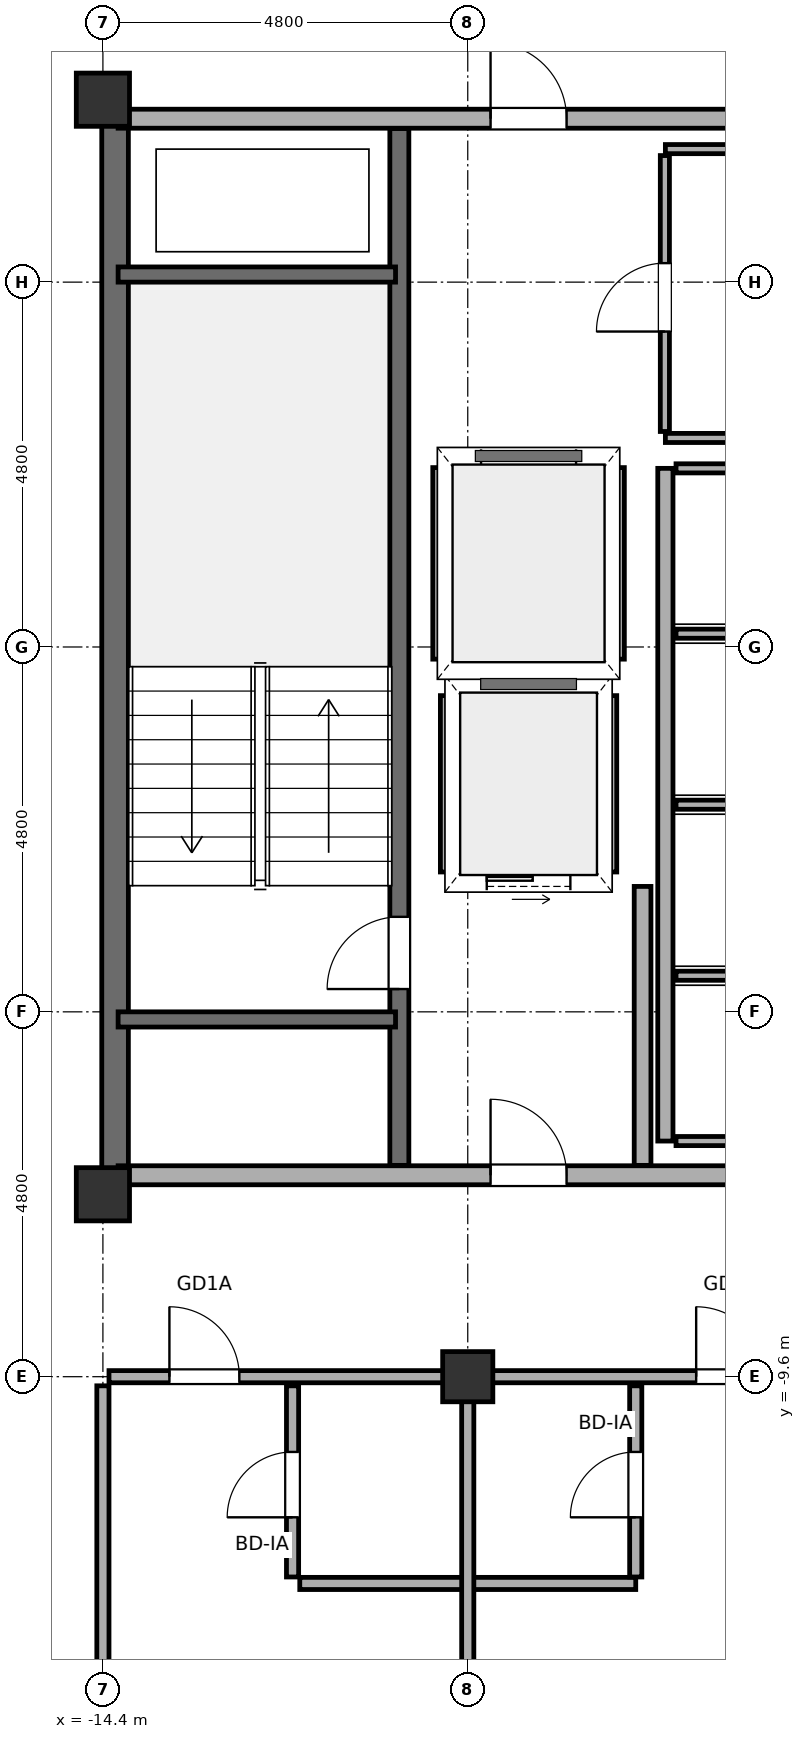
"""IFC4 building model, lengths in metres.
Left out: names, types, materials, properties, quantities, classifications, styles, units other than length and angle.
Written with IfcOpenShell. Run it as: python <this file> out.ifc"""

import sys

from ifc_helpers import new_model, si_unit, direction, frame, frame_2d, origin, origin_2d, place, context, subcontext, project, spatial, rectangle, hollow_rectangle, hollow_circle, extrude, element, fill, save


model = new_model("IFC4")
c1 = context("Model", 3, precision=1e-05, world=origin(), true_north=direction((0.0, 1.0)))
c2 = subcontext(c1, "Body", "Model", "MODEL_VIEW")
j1 = project(units=[si_unit("LENGTHUNIT", "METRE"), si_unit("PLANEANGLEUNIT", "RADIAN")], contexts=[c1])
p1 = place(None, origin())
s1 = spatial("IfcSite", under=j1, at=p1, CompositionType="ELEMENT")
p2 = place(p1, origin())
s2 = spatial("IfcBuilding", under=s1, at=p2, CompositionType="ELEMENT")
p3 = place(p2, frame((0.0, 0.0, 124.8)))
s3 = spatial("IfcBuildingStorey", under=s2, at=p3, CompositionType="ELEMENT", Elevation=124.8)
for number, where, z_axis, x_axis in (
    (1, (-14.4, -7.2, 0.0), (0.0, 0.0, 1.0), (1.0, 0.0, 0.0)),
    (2, (-14.4, 7.2, 0.0), (0.0, 0.0, 1.0), (1.0, 0.0, 0.0)),
):
    element("IfcColumn", number, at=place(p3, frame(where, z_axis=z_axis, x_axis=x_axis)), inside=s3, PredefinedType="COLUMN", context=c2, shape_type="SweptSolid", body=[
        extrude(hollow_rectangle(XDim=0.7, YDim=0.7, WallThickness=0.032, at=origin_2d()), origin(), (0.0, 0.0, 1.0), 3.7),
    ])
p4 = place(p3, frame((-9.6, -9.6, 0.0), z_axis=(0.0, 0.0, 1.0), x_axis=(1.0, 0.0, 0.0)))
e3 = element("IfcColumn", 3, at=p4, inside=s3, PredefinedType="COLUMN", context=c2, shape_type="SweptSolid", body=[
    extrude(hollow_circle(Radius=0.33, WallThickness=0.028, at=origin_2d()), origin(), (0.0, 0.0, 1.0), 3.7),
])
p5 = place(p3, frame((-14.24, -7.2, -0.18), z_axis=(0.0, 0.0, 1.0), x_axis=(0.0, 1.0, 0.0)))
e4 = element("IfcWall", 4, at=p5, inside=s3, PredefinedType="SHEAR", context=c2, shape_type="SweptSolid", body=[
    extrude(rectangle(XDim=14.4, YDim=0.35, at=frame_2d((7.2, 0.0))), origin(), (0.0, 0.0, 1.0), 3.7),
])
p6 = place(p3, frame((-14.2, -6.95, 0.0), z_axis=(0.0, 0.0, 1.0), x_axis=(1.0, 0.0, 0.0)))
e5 = element("IfcWall", 5, at=p6, inside=s3, PredefinedType="SOLIDWALL", context=c2, shape_type="SweptSolid", body=[
    extrude(rectangle(XDim=9.4, YDim=0.25, at=frame_2d((4.7, 0.0))), origin(), (0.0, 0.0, 1.0), 2.12),
])
p7 = place(p6, frame((4.9, 0.0, 0.0)))
e6 = element("IfcOpeningElement", 6, at=p7, cuts=e5, PredefinedType="OPENING", context=c2, shape_type="SweptSolid", body=[
    extrude(rectangle(XDim=1.0, YDim=2.02, at=frame_2d((0.5, 1.01))), frame((0.0, 0.14, 0.0), z_axis=(0.0, -1.0, 0.0), x_axis=(1.0, 0.0, 0.0)), (0.0, 0.0, 1.0), 0.28),
])
p8 = place(p3, frame((-14.2, 6.95, 0.0), z_axis=(0.0, 0.0, 1.0), x_axis=(1.0, 0.0, 0.0)))
e7 = element("IfcWall", 7, at=p8, inside=s3, PredefinedType="SOLIDWALL", context=c2, shape_type="SweptSolid", body=[
    extrude(rectangle(XDim=9.4, YDim=0.25, at=frame_2d((4.7, 0.0))), origin(), (0.0, 0.0, 1.0), 2.12),
])
p9 = place(p8, frame((4.9, 0.0, 0.0)))
e8 = element("IfcOpeningElement", 8, at=p9, cuts=e7, PredefinedType="OPENING", context=c2, shape_type="SweptSolid", body=[
    extrude(rectangle(XDim=1.0, YDim=2.02, at=frame_2d((0.5, 1.01))), frame((0.0, 0.14, 0.0), z_axis=(0.0, -1.0, 0.0), x_axis=(1.0, 0.0, 0.0)), (0.0, 0.0, 1.0), 0.28),
])
p10 = place(p3, frame((-7.3, -6.82, 0.0), z_axis=(0.0, 0.0, 1.0), x_axis=(0.0, 1.0, 0.0)))
e9 = element("IfcWall", 9, at=p10, inside=s3, PredefinedType="SOLIDWALL", context=c2, shape_type="SweptSolid", body=[
    extrude(rectangle(XDim=3.67, YDim=0.22, at=frame_2d((1.835, 0.0))), origin(), (0.0, 0.0, 1.0), 2.12),
])
p11 = place(p3, frame((-10.5, -6.82, -0.18), z_axis=(0.0, 0.0, 1.0), x_axis=(0.0, 1.0, 0.0)))
e10 = element("IfcWall", 10, at=p11, inside=s3, PredefinedType="SOLIDWALL", context=c2, shape_type="SweptSolid", body=[
    extrude(rectangle(XDim=13.64, YDim=0.25, at=frame_2d((6.82, 0.0))), origin(), (0.0, 0.0, 1.0), 3.7),
])
p12 = place(p11, frame((2.32, 0.0, 0.18)))
e11 = element("IfcOpeningElement", 11, at=p12, cuts=e10, PredefinedType="OPENING", context=c2, shape_type="SweptSolid", body=[
    extrude(rectangle(XDim=0.95, YDim=2.15, at=frame_2d((0.475, 1.075))), frame((0.0, 0.14, 0.0), z_axis=(0.0, -1.0, 0.0), x_axis=(1.0, 0.0, 0.0)), (0.0, 0.0, 1.0), 0.28),
])
for number, where, z_axis, x_axis in (
    (12, (-14.2, -4.9, -0.18), (0.0, 0.0, 1.0), (1.0, 0.0, 0.0)),
    (13, (-14.2, 4.9, -0.18), (0.0, 0.0, 1.0), (1.0, 0.0, 0.0)),
):
    element("IfcWall", number, at=place(p3, frame(where, z_axis=z_axis, x_axis=x_axis)), inside=s3, PredefinedType="SOLIDWALL", context=c2, shape_type="SweptSolid", body=[
        extrude(rectangle(XDim=3.65, YDim=0.2, at=frame_2d((1.825, 0.0))), origin(), (0.0, 0.0, 1.0), 3.7),
    ])
p13 = place(p3, frame((-7.0, -6.5, 0.0), z_axis=(0.0, 0.0, 1.0), x_axis=(0.0, 1.0, 0.0)))
e14 = element("IfcWall", 14, at=p13, inside=s3, PredefinedType="SOLIDWALL", context=c2, shape_type="SweptSolid", body=[
    extrude(rectangle(XDim=8.85, YDim=0.2, at=frame_2d((4.425, 0.0))), origin(), (0.0, 0.0, 1.0), 3.52),
])
for number, where, z_axis, x_axis in (
    (15, (-6.86, -6.5, 0.0), (0.0, 0.0, 1.0), (1.0, 0.0, 0.0)),
    (16, (-6.86, -4.325, 0.0), (0.0, 0.0, 1.0), (1.0, 0.0, 0.0)),
    (17, (-6.86, -2.075, 0.0), (0.0, 0.0, 1.0), (1.0, 0.0, 0.0)),
    (18, (-6.86, 0.175, 0.0), (0.0, 0.0, 1.0), (1.0, 0.0, 0.0)),
    (19, (-6.86, 2.35, 0.0), (0.0, 0.0, 1.0), (1.0, 0.0, 0.0)),
):
    element("IfcWall", number, at=place(p3, frame(where, z_axis=z_axis, x_axis=x_axis)), inside=s3, PredefinedType="PARTITIONING", context=c2, shape_type="SweptSolid", body=[
        extrude(rectangle(XDim=2.22, YDim=0.12, at=frame_2d((1.11, 0.0))), origin(), (0.0, 0.0, 1.0), 3.52),
    ])
p14 = place(p3, frame((-9.82, -3.1, 0.0), z_axis=(0.0, 0.0, 1.0), x_axis=(1.0, 0.0, 0.0)))
e20 = element("IfcWall", 20, at=p14, inside=s3, PredefinedType="SOLIDWALL", context=c2, shape_type="SweptSolid", body=[
    extrude(rectangle(XDim=2.04, YDim=0.2, at=frame_2d((1.02, 0.0))), origin(), (0.0, 0.0, 1.0), 3.52),
])
p15 = place(p14, frame((0.47, 0.0, 0.0)))
e21 = element("IfcOpeningElement", 21, at=p15, cuts=e20, PredefinedType="OPENING", context=c2, shape_type="SweptSolid", body=[
    extrude(rectangle(XDim=1.1, YDim=2.2, at=frame_2d((0.55, 1.1))), frame((0.0, 0.115, 0.0), z_axis=(0.0, -1.0, 0.0), x_axis=(1.0, 0.0, 0.0)), (0.0, 0.0, 1.0), 0.23),
])
p16 = place(p3, frame((-9.82, -0.5, 0.0), z_axis=(0.0, 0.0, 1.0), x_axis=(1.0, 0.0, 0.0)))
e22 = element("IfcWall", 22, at=p16, inside=s3, PredefinedType="SOLIDWALL", context=c2, shape_type="SweptSolid", body=[
    extrude(rectangle(XDim=2.04, YDim=0.2, at=frame_2d((1.02, 0.0))), origin(), (0.0, 0.0, 1.0), 3.52),
])
for number, where, z_axis, x_axis in (
    (23, (-9.9, -2.96, 0.0), (0.0, 0.0, 1.0), (0.0, 1.0, 0.0)),
    (24, (-7.7, -2.96, 0.0), (0.0, 0.0, 1.0), (0.0, 1.0, 0.0)),
):
    element("IfcWall", number, at=place(p3, frame(where, z_axis=z_axis, x_axis=x_axis)), inside=s3, PredefinedType="PARTITIONING", context=c2, shape_type="SweptSolid", body=[
        extrude(rectangle(XDim=2.32, YDim=0.12, at=frame_2d((1.16, 0.0))), origin(), (0.0, 0.0, 1.0), 3.52),
    ])
p17 = place(p3, frame((-9.92, 2.5, 0.0), z_axis=(0.0, 0.0, 1.0), x_axis=(1.0, 0.0, 0.0)))
e25 = element("IfcWall", 25, at=p17, inside=s3, PredefinedType="SOLIDWALL", context=c2, shape_type="SweptSolid", body=[
    extrude(rectangle(XDim=2.24, YDim=0.2, at=frame_2d((1.12, 0.0))), origin(), (0.0, 0.0, 1.0), 3.52),
])
p18 = place(p17, frame((0.495, 0.0, 0.0)))
e26 = element("IfcOpeningElement", 26, at=p18, cuts=e25, PredefinedType="OPENING", context=c2, shape_type="SweptSolid", body=[
    extrude(rectangle(XDim=1.25, YDim=2.25, at=frame_2d((0.625, 1.125))), frame((0.0, 0.115, 0.0), z_axis=(0.0, -1.0, 0.0), x_axis=(1.0, 0.0, 0.0)), (0.0, 0.0, 1.0), 0.23),
])
p19 = place(p3, frame((-9.92, -0.3, 0.0), z_axis=(0.0, 0.0, 1.0), x_axis=(1.0, 0.0, 0.0)))
e27 = element("IfcWall", 27, at=p19, inside=s3, PredefinedType="SOLIDWALL", context=c2, shape_type="SweptSolid", body=[
    extrude(rectangle(XDim=2.24, YDim=0.2, at=frame_2d((1.12, 0.0))), origin(), (0.0, 0.0, 1.0), 3.52),
])
for number, where, z_axis, x_axis in (
    (28, (-10.0, -0.16, 0.0), (0.0, 0.0, 1.0), (0.0, 1.0, 0.0)),
    (29, (-7.6, -0.16, 0.0), (0.0, 0.0, 1.0), (0.0, 1.0, 0.0)),
):
    element("IfcWall", number, at=place(p3, frame(where, z_axis=z_axis, x_axis=x_axis)), inside=s3, PredefinedType="PARTITIONING", context=c2, shape_type="SweptSolid", body=[
        extrude(rectangle(XDim=2.52, YDim=0.12, at=frame_2d((1.26, 0.0))), origin(), (0.0, 0.0, 1.0), 3.52),
    ])
p20 = place(p3, frame((-11.81, -12.32, 0.0), z_axis=(0.0, 0.0, 1.0), x_axis=(1.0, 0.0, 0.0)))
e30 = element("IfcWall", 30, at=p20, inside=s3, PredefinedType="PARTITIONING", context=c2, shape_type="SweptSolid", body=[
    extrude(rectangle(XDim=4.42, YDim=0.16, at=frame_2d((2.21, 0.0))), origin(), (0.0, 0.0, 1.0), 3.12),
])
p21 = place(p3, frame((-14.32, -9.6, 0.0), z_axis=(0.0, 0.0, 1.0), x_axis=(1.0, 0.0, 0.0)))
e31 = element("IfcWall", 31, at=p21, inside=s3, PredefinedType="PARTITIONING", context=c2, shape_type="SweptSolid", body=[
    extrude(rectangle(XDim=28.64, YDim=0.16, at=frame_2d((14.32, 0.0))), origin(), (0.0, 0.0, 1.0), 2.12),
])
p22 = place(p21, frame((0.795, 0.0, 0.0)))
e32 = element("IfcOpeningElement", 32, at=p22, cuts=e31, PredefinedType="OPENING", context=c2, shape_type="SweptSolid", body=[
    extrude(rectangle(XDim=0.92, YDim=2.02, at=frame_2d((0.46, 1.01))), frame((0.0, 0.095, 0.0), z_axis=(0.0, -1.0, 0.0), x_axis=(1.0, 0.0, 0.0)), (0.0, 0.0, 1.0), 0.19),
])
p23 = place(p21, frame((7.725, 0.0, 0.0)))
e33 = element("IfcOpeningElement", 33, at=p23, cuts=e31, PredefinedType="OPENING", context=c2, shape_type="SweptSolid", body=[
    extrude(rectangle(XDim=0.92, YDim=2.02, at=frame_2d((0.46, 1.01))), frame((0.0, 0.095, 0.0), z_axis=(0.0, -1.0, 0.0), x_axis=(1.0, 0.0, 0.0)), (0.0, 0.0, 1.0), 0.19),
])
p24 = place(p21, frame((10.395, 0.0, 0.0)))
e34 = element("IfcOpeningElement", 34, at=p24, cuts=e31, PredefinedType="OPENING", context=c2, shape_type="SweptSolid", body=[
    extrude(rectangle(XDim=0.92, YDim=2.02, at=frame_2d((0.46, 1.01))), frame((0.0, 0.095, 0.0), z_axis=(0.0, -1.0, 0.0), x_axis=(1.0, 0.0, 0.0)), (0.0, 0.0, 1.0), 0.19),
])
p25 = place(p21, frame((17.325, 0.0, 0.0)))
e35 = element("IfcOpeningElement", 35, at=p25, cuts=e31, PredefinedType="OPENING", context=c2, shape_type="SweptSolid", body=[
    extrude(rectangle(XDim=0.92, YDim=2.02, at=frame_2d((0.46, 1.01))), frame((0.0, 0.095, 0.0), z_axis=(0.0, -1.0, 0.0), x_axis=(1.0, 0.0, 0.0)), (0.0, 0.0, 1.0), 0.19),
])
p26 = place(p21, frame((19.995, 0.0, 0.0)))
e36 = element("IfcOpeningElement", 36, at=p26, cuts=e31, PredefinedType="OPENING", context=c2, shape_type="SweptSolid", body=[
    extrude(rectangle(XDim=0.92, YDim=2.02, at=frame_2d((0.46, 1.01))), frame((0.0, 0.095, 0.0), z_axis=(0.0, -1.0, 0.0), x_axis=(1.0, 0.0, 0.0)), (0.0, 0.0, 1.0), 0.19),
])
p27 = place(p21, frame((26.925, 0.0, 0.0)))
e37 = element("IfcOpeningElement", 37, at=p27, cuts=e31, PredefinedType="OPENING", context=c2, shape_type="SweptSolid", body=[
    extrude(rectangle(XDim=0.92, YDim=2.02, at=frame_2d((0.46, 1.01))), frame((0.0, 0.095, 0.0), z_axis=(0.0, -1.0, 0.0), x_axis=(1.0, 0.0, 0.0)), (0.0, 0.0, 1.0), 0.19),
])
for number, where, z_axis, x_axis in (
    (38, (-7.0, 2.75, 0.0), (0.0, 0.0, 1.0), (1.0, 0.0, 0.0)),
    (39, (-7.0, 6.55, 0.0), (0.0, 0.0, 1.0), (1.0, 0.0, 0.0)),
):
    element("IfcWall", number, at=place(p3, frame(where, z_axis=z_axis, x_axis=x_axis)), inside=s3, PredefinedType="PARTITIONING", context=c2, shape_type="SweptSolid", body=[
        extrude(rectangle(XDim=2.31, YDim=0.12, at=frame_2d((1.155, 0.0))), origin(), (0.0, 0.0, 1.0), 3.52),
    ])
p28 = place(p3, frame((-14.4, -18.91, 0.0), z_axis=(0.0, 0.0, 1.0), x_axis=(0.0, 1.0, 0.0)))
e40 = element("IfcWall", 40, at=p28, inside=s3, PredefinedType="PARTITIONING", context=c2, shape_type="SweptSolid", body=[
    extrude(rectangle(XDim=9.19, YDim=0.16, at=frame_2d((4.595, 0.0))), origin(), (0.0, 0.0, 1.0), 2.12),
])
p29 = place(p3, frame((-11.905, -12.235, 0.0), z_axis=(0.0, 0.0, 1.0), x_axis=(0.0, 1.0, 0.0)))
e41 = element("IfcWall", 41, at=p29, inside=s3, PredefinedType="PARTITIONING", context=c2, shape_type="SweptSolid", body=[
    extrude(rectangle(XDim=2.515, YDim=0.16, at=frame_2d((1.258, 0.0))), origin(), (0.0, 0.0, 1.0), 2.12),
])
p30 = place(p29, frame((0.785, 0.0, 0.0)))
e42 = element("IfcOpeningElement", 42, at=p30, cuts=e41, PredefinedType="OPENING", context=c2, shape_type="SweptSolid", body=[
    extrude(rectangle(XDim=0.86, YDim=2.02, at=frame_2d((0.43, 1.01))), frame((0.0, 0.095, 0.0), z_axis=(0.0, -1.0, 0.0), x_axis=(1.0, 0.0, 0.0)), (0.0, 0.0, 1.0), 0.19),
])
p31 = place(p3, frame((-9.6, -18.91, 0.0), z_axis=(0.0, 0.0, 1.0), x_axis=(0.0, 1.0, 0.0)))
e43 = element("IfcWall", 43, at=p31, inside=s3, PredefinedType="PARTITIONING", context=c2, shape_type="SweptSolid", body=[
    extrude(rectangle(XDim=9.19, YDim=0.16, at=frame_2d((4.595, 0.0))), origin(), (0.0, 0.0, 1.0), 2.12),
])
p32 = place(p3, frame((-7.39, -12.235, 0.0), z_axis=(0.0, 0.0, 1.0), x_axis=(0.0, 1.0, 0.0)))
e44 = element("IfcWall", 44, at=p32, inside=s3, PredefinedType="PARTITIONING", context=c2, shape_type="SweptSolid", body=[
    extrude(rectangle(XDim=2.515, YDim=0.16, at=frame_2d((1.258, 0.0))), origin(), (0.0, 0.0, 1.0), 2.12),
])
p33 = place(p32, frame((0.785, 0.0, 0.0)))
e45 = element("IfcOpeningElement", 45, at=p33, cuts=e44, PredefinedType="OPENING", context=c2, shape_type="SweptSolid", body=[
    extrude(rectangle(XDim=0.86, YDim=2.02, at=frame_2d((0.43, 1.01))), frame((0.0, 0.095, 0.0), z_axis=(0.0, -1.0, 0.0), x_axis=(1.0, 0.0, 0.0)), (0.0, 0.0, 1.0), 0.19),
])
p34 = place(p3, frame((-7.007, 2.835, 0.0), z_axis=(0.0, 0.0, 1.0), x_axis=(0.0, 1.0, 0.0)))
e46 = element("IfcWall", 46, at=p34, inside=s3, PredefinedType="PARTITIONING", context=c2, shape_type="SweptSolid", body=[
    extrude(rectangle(XDim=3.63, YDim=0.12, at=frame_2d((1.815, 0.0))), origin(), (0.0, 0.0, 1.0), 3.52),
])
p35 = place(p34, frame((1.315, 0.0, 0.0)))
e47 = element("IfcOpeningElement", 47, at=p35, cuts=e46, PredefinedType="OPENING", context=c2, shape_type="SweptSolid", body=[
    extrude(rectangle(XDim=0.9, YDim=2.1, at=frame_2d((0.45, 1.05))), frame((0.0, 0.075, 0.0), z_axis=(0.0, -1.0, 0.0), x_axis=(1.0, 0.0, 0.0)), (0.0, 0.0, 1.0), 0.15),
])
p36 = place(p7, origin())
e48 = element("IfcDoor", 48, at=p36, inside=s3, OperationType="SINGLE_SWING_RIGHT", PredefinedType="DOOR", context=c2, shape_type="SweptSolid", body=[
    extrude(rectangle(XDim=1.0, YDim=2.02, at=frame_2d((0.5, 1.01))), frame((0.0, 0.025, 0.0), z_axis=(0.0, -1.0, 0.0), x_axis=(1.0, 0.0, 0.0)), (0.0, 0.0, 1.0), 0.05),
])
fill(e6, e48)
p37 = place(p9, origin())
e49 = element("IfcDoor", 49, at=p37, inside=s3, OperationType="SINGLE_SWING_LEFT", PredefinedType="DOOR", context=c2, shape_type="SweptSolid", body=[
    extrude(rectangle(XDim=1.0, YDim=2.02, at=frame_2d((0.5, 1.01))), frame((0.0, 0.025, 0.0), z_axis=(0.0, -1.0, 0.0), x_axis=(1.0, 0.0, 0.0)), (0.0, 0.0, 1.0), 0.05),
])
fill(e8, e49)
p38 = place(p12, origin())
e50 = element("IfcDoor", 50, at=p38, inside=s3, OperationType="SINGLE_SWING_RIGHT", PredefinedType="DOOR", context=c2, shape_type="SweptSolid", body=[
    extrude(rectangle(XDim=0.95, YDim=2.15, at=frame_2d((0.475, 1.075))), frame((0.0, 0.025, 0.0), z_axis=(0.0, -1.0, 0.0), x_axis=(1.0, 0.0, 0.0)), (0.0, 0.0, 1.0), 0.05),
])
fill(e11, e50)
p39 = place(p15, origin())
e51 = element("IfcDoor", 51, at=p39, inside=s3, OperationType="SLIDING_TO_LEFT", PredefinedType="DOOR", context=c2, shape_type="SweptSolid", body=[
    extrude(rectangle(XDim=1.1, YDim=2.2, at=frame_2d((0.55, 1.1))), frame((0.0, 0.025, 0.0), z_axis=(0.0, -1.0, 0.0), x_axis=(1.0, 0.0, 0.0)), (0.0, 0.0, 1.0), 0.05),
])
fill(e21, e51)
p40 = place(p18, origin())
e52 = element("IfcDoor", 52, at=p40, inside=s3, OperationType="SLIDING_TO_LEFT", PredefinedType="DOOR", context=c2, shape_type="SweptSolid", body=[
    extrude(rectangle(XDim=1.25, YDim=2.25, at=frame_2d((0.625, 1.125))), frame((0.0, 0.025, 0.0), z_axis=(0.0, -1.0, 0.0), x_axis=(1.0, 0.0, 0.0)), (0.0, 0.0, 1.0), 0.05),
])
fill(e26, e52)
p41 = place(p35, origin())
e53 = element("IfcDoor", 53, at=p41, inside=s3, OperationType="SINGLE_SWING_RIGHT", PredefinedType="DOOR", context=c2, shape_type="SweptSolid", body=[
    extrude(rectangle(XDim=0.9, YDim=2.1, at=frame_2d((0.45, 1.05))), frame((0.0, 0.025, 0.0), z_axis=(0.0, -1.0, 0.0), x_axis=(1.0, 0.0, 0.0)), (0.0, 0.0, 1.0), 0.05),
])
fill(e47, e53)
p42 = place(p22, origin())
e54 = element("IfcDoor", 54, at=p42, inside=s3, OperationType="SINGLE_SWING_LEFT", PredefinedType="DOOR", context=c2, shape_type="SweptSolid", body=[
    extrude(rectangle(XDim=0.92, YDim=2.02, at=frame_2d((0.46, 1.01))), frame((0.0, 0.025, 0.0), z_axis=(0.0, -1.0, 0.0), x_axis=(1.0, 0.0, 0.0)), (0.0, 0.0, 1.0), 0.05),
])
fill(e32, e54)
p43 = place(p30, origin())
e55 = element("IfcDoor", 55, at=p43, inside=s3, OperationType="SINGLE_SWING_LEFT", PredefinedType="DOOR", context=c2, shape_type="SweptSolid", body=[
    extrude(rectangle(XDim=0.86, YDim=2.02, at=frame_2d((0.43, 1.01))), frame((0.0, 0.025, 0.0), z_axis=(0.0, -1.0, 0.0), x_axis=(1.0, 0.0, 0.0)), (0.0, 0.0, 1.0), 0.05),
])
fill(e42, e55)
p44 = place(p23, origin())
e56 = element("IfcDoor", 56, at=p44, inside=s3, OperationType="SINGLE_SWING_LEFT", PredefinedType="DOOR", context=c2, shape_type="SweptSolid", body=[
    extrude(rectangle(XDim=0.92, YDim=2.02, at=frame_2d((0.46, 1.01))), frame((0.0, 0.025, 0.0), z_axis=(0.0, -1.0, 0.0), x_axis=(1.0, 0.0, 0.0)), (0.0, 0.0, 1.0), 0.05),
])
fill(e33, e56)
p45 = place(p33, origin())
e57 = element("IfcDoor", 57, at=p45, inside=s3, OperationType="SINGLE_SWING_RIGHT", PredefinedType="DOOR", context=c2, shape_type="SweptSolid", body=[
    extrude(rectangle(XDim=0.86, YDim=2.02, at=frame_2d((0.43, 1.01))), frame((0.0, 0.025, 0.0), z_axis=(0.0, -1.0, 0.0), x_axis=(1.0, 0.0, 0.0)), (0.0, 0.0, 1.0), 0.05),
])
fill(e45, e57)
save(model, sys.argv[1])
